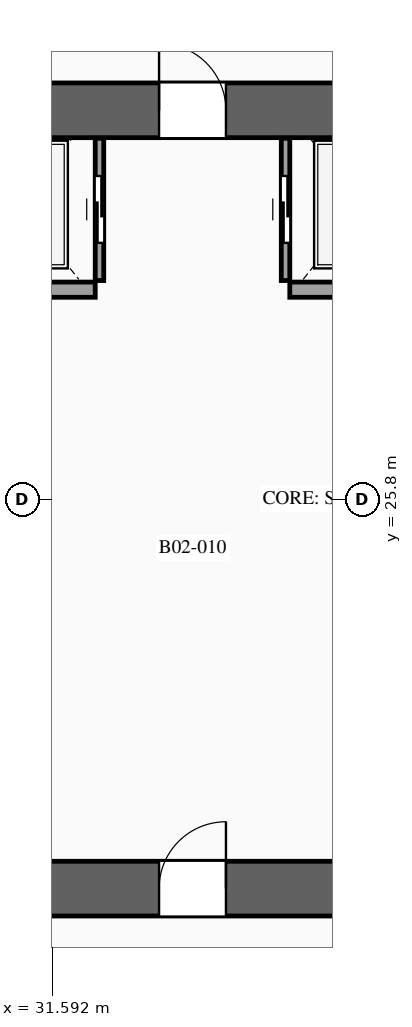
"""IFC4 building model, lengths in metres.
Left out: names, types, materials, properties, quantities, classifications, styles, units other than length and angle.
Written with IfcOpenShell. Run it as: python <this file> out.ifc"""

import sys

from ifc_helpers import new_model, si_unit, direction, frame, frame_2d, origin, place, context, subcontext, project, spatial, rectangle, extrude, source, transform, mapped, element, fill, save


model = new_model("IFC4")
c1 = context("Model", 3, precision=1e-05, world=origin(), true_north=direction((0.0, 1.0)))
c2 = subcontext(c1, "Body", "Model", "MODEL_VIEW")
j1 = project(units=[si_unit("LENGTHUNIT", "METRE"), si_unit("PLANEANGLEUNIT", "RADIAN")], contexts=[c1])
p1 = place(None, origin())
s1 = spatial("IfcSite", under=j1, at=p1, CompositionType="ELEMENT")
p2 = place(p1, origin())
s2 = spatial("IfcBuilding", under=s1, at=p2, CompositionType="ELEMENT")
p3 = place(p2, frame((0.0, 0.0, -9.0)))
s3 = spatial("IfcBuildingStorey", under=s2, at=p3, CompositionType="ELEMENT", Elevation=-9.0)
p4 = place(p3, frame((23.35, 19.4, 0.0), z_axis=(0.0, 0.0, 1.0), x_axis=(1.0, 0.0, 0.0)))
e1 = element("IfcWall", 1, at=p4, inside=s3, PredefinedType="SHEAR", context=c2, shape_type="SweptSolid", body=[
    extrude(rectangle(XDim=27.3, YDim=0.9, at=frame_2d((13.65, 0.0))), origin(), (0.0, 0.0, 1.0), 4.5),
])
p5 = place(p4, frame((2.1, 0.0, 0.0)))
e2 = element("IfcOpeningElement", 2, at=p5, cuts=e1, PredefinedType="OPENING", context=c2, shape_type="SweptSolid", body=[
    extrude(rectangle(XDim=1.1, YDim=2.2, at=frame_2d((0.55, 1.1))), frame((0.0, 0.465, 0.0), z_axis=(0.0, -1.0, 0.0), x_axis=(1.0, 0.0, 0.0)), (0.0, 0.0, 1.0), 0.93),
])
p6 = place(p4, frame((10.0, 0.0, 0.0)))
e3 = element("IfcOpeningElement", 3, at=p6, cuts=e1, PredefinedType="OPENING", context=c2, shape_type="SweptSolid", body=[
    extrude(rectangle(XDim=1.1, YDim=2.2, at=frame_2d((0.55, 1.1))), frame((0.0, 0.465, 0.0), z_axis=(0.0, -1.0, 0.0), x_axis=(1.0, 0.0, 0.0)), (0.0, 0.0, 1.0), 0.93),
])
p7 = place(p4, frame((23.2, 0.0, 0.0)))
e4 = element("IfcOpeningElement", 4, at=p7, cuts=e1, PredefinedType="OPENING", context=c2, shape_type="SweptSolid", body=[
    extrude(rectangle(XDim=1.1, YDim=2.2, at=frame_2d((0.55, 1.1))), frame((0.0, 0.465, 0.0), z_axis=(0.0, -1.0, 0.0), x_axis=(1.0, 0.0, 0.0)), (0.0, 0.0, 1.0), 0.93),
])
p8 = place(p4, frame((19.82, 0.0, 0.0)))
e5 = element("IfcOpeningElement", 5, at=p8, cuts=e1, PredefinedType="OPENING", context=c2, shape_type="SweptSolid", body=[
    extrude(rectangle(XDim=0.9, YDim=2.15, at=frame_2d((0.45, 1.075))), frame((0.0, 0.465, 0.0), z_axis=(0.0, -1.0, 0.0), x_axis=(1.0, 0.0, 0.0)), (0.0, 0.0, 1.0), 0.93),
])
p9 = place(p4, frame((18.38, 0.0, 0.0)))
e6 = element("IfcOpeningElement", 6, at=p9, cuts=e1, PredefinedType="OPENING", context=c2, shape_type="SweptSolid", body=[
    extrude(rectangle(XDim=0.9, YDim=2.15, at=frame_2d((0.45, 1.075))), frame((0.0, 0.465, 0.0), z_axis=(0.0, -1.0, 0.0), x_axis=(1.0, 0.0, 0.0)), (0.0, 0.0, 1.0), 0.93),
])
p10 = place(p3, frame((23.35, 32.2, 0.0), z_axis=(0.0, 0.0, 1.0), x_axis=(1.0, 0.0, 0.0)))
e7 = element("IfcWall", 7, at=p10, inside=s3, PredefinedType="SHEAR", context=c2, shape_type="SweptSolid", body=[
    extrude(rectangle(XDim=27.3, YDim=0.9, at=frame_2d((13.65, 0.0))), origin(), (0.0, 0.0, 1.0), 4.5),
])
p11 = place(p10, frame((4.72, 0.0, 0.0)))
e8 = element("IfcOpeningElement", 8, at=p11, cuts=e7, PredefinedType="OPENING", context=c2, shape_type="SweptSolid", body=[
    extrude(rectangle(XDim=0.9, YDim=2.15, at=frame_2d((0.45, 1.075))), frame((0.0, 0.465, 0.0), z_axis=(0.0, -1.0, 0.0), x_axis=(1.0, 0.0, 0.0)), (0.0, 0.0, 1.0), 0.93),
])
p12 = place(p10, frame((10.0, 0.0, 0.0)))
e9 = element("IfcOpeningElement", 9, at=p12, cuts=e7, PredefinedType="OPENING", context=c2, shape_type="SweptSolid", body=[
    extrude(rectangle(XDim=1.1, YDim=2.2, at=frame_2d((0.55, 1.1))), frame((0.0, 0.465, 0.0), z_axis=(0.0, -1.0, 0.0), x_axis=(1.0, 0.0, 0.0)), (0.0, 0.0, 1.0), 0.93),
])
p13 = place(p10, frame((15.85, 0.0, 0.0)))
e10 = element("IfcOpeningElement", 10, at=p13, cuts=e7, PredefinedType="OPENING", context=c2, shape_type="SweptSolid", body=[
    extrude(rectangle(XDim=1.1, YDim=2.2, at=frame_2d((0.55, 1.1))), frame((0.0, 0.465, 0.0), z_axis=(0.0, -1.0, 0.0), x_axis=(1.0, 0.0, 0.0)), (0.0, 0.0, 1.0), 0.93),
])
p14 = place(p3, frame((32.37, 29.4, 0.0), z_axis=(0.0, 0.0, 1.0), x_axis=(0.0, 1.0, 0.0)))
e11 = element("IfcWall", 11, at=p14, inside=s3, PredefinedType="SOLIDWALL", context=c2, shape_type="SweptSolid", body=[
    extrude(rectangle(XDim=2.34, YDim=0.14, at=frame_2d((1.17, 0.0))), origin(), (0.0, 0.0, 1.0), 4.2),
])
p15 = place(p14, frame((0.62, 0.0, 0.0)))
e12 = element("IfcOpeningElement", 12, at=p15, cuts=e11, PredefinedType="OPENING", context=c2, shape_type="SweptSolid", body=[
    extrude(rectangle(XDim=1.1, YDim=2.2, at=frame_2d((0.55, 1.1))), frame((0.0, 0.085, 0.0), z_axis=(0.0, -1.0, 0.0), x_axis=(1.0, 0.0, 0.0)), (0.0, 0.0, 1.0), 0.17),
])
m1 = source(origin(), c2, "Body", "SweptSolid", [
    extrude(rectangle(XDim=2.5, YDim=0.25, at=frame_2d((1.25, 0.0))), origin(), (0.0, 0.0, 1.0), 4.2),
])
p16 = place(p3, frame((29.8, 29.25, 0.0), z_axis=(0.0, 0.0, 1.0), x_axis=(1.0, 0.0, 0.0)))
e13 = element("IfcWall", 13, at=p16, inside=s3, PredefinedType="SOLIDWALL", context=c2, shape_type="MappedRepresentation", body=[
    mapped(m1, transform((0.0, 0.0, 0.0), scale=1.0)),
])
p17 = place(p3, frame((35.43, 29.4, 0.0), z_axis=(0.0, 0.0, 1.0), x_axis=(0.0, 1.0, 0.0)))
e14 = element("IfcWall", 14, at=p17, inside=s3, PredefinedType="SOLIDWALL", context=c2, shape_type="SweptSolid", body=[
    extrude(rectangle(XDim=2.34, YDim=0.14, at=frame_2d((1.17, 0.0))), origin(), (0.0, 0.0, 1.0), 4.2),
])
p18 = place(p17, frame((0.62, 0.0, 0.0)))
e15 = element("IfcOpeningElement", 15, at=p18, cuts=e14, PredefinedType="OPENING", context=c2, shape_type="SweptSolid", body=[
    extrude(rectangle(XDim=1.1, YDim=2.2, at=frame_2d((0.55, 1.1))), frame((0.0, 0.085, 0.0), z_axis=(0.0, -1.0, 0.0), x_axis=(1.0, 0.0, 0.0)), (0.0, 0.0, 1.0), 0.17),
])
m2 = source(origin(), c2, "Body", "SweptSolid", [
    extrude(rectangle(XDim=2.4, YDim=0.25, at=frame_2d((1.2, 0.0))), origin(), (0.0, 0.0, 1.0), 4.2),
])
p19 = place(p3, frame((35.5, 29.25, 0.0), z_axis=(0.0, 0.0, 1.0), x_axis=(1.0, 0.0, 0.0)))
e16 = element("IfcWall", 16, at=p19, inside=s3, PredefinedType="SOLIDWALL", context=c2, shape_type="MappedRepresentation", body=[
    mapped(m2, transform((0.0, 0.0, 0.0), scale=1.0)),
])
m3 = source(origin(), c2, "Body", "SweptSolid", [
    extrude(rectangle(XDim=1.1, YDim=2.2, at=frame_2d((0.55, 1.1))), frame((0.0, 0.025, 0.0), z_axis=(0.0, -1.0, 0.0), x_axis=(1.0, 0.0, 0.0)), (0.0, 0.0, 1.0), 0.05),
])
p20 = place(p15, origin())
e17 = element("IfcDoor", 17, at=p20, inside=s3, OperationType="SLIDING_TO_LEFT", PredefinedType="DOOR", context=c2, shape_type="MappedRepresentation", body=[
    mapped(m3, transform((0.0, 0.0, 0.0), scale=1.0)),
])
fill(e12, e17)
p21 = place(p18, origin())
e18 = element("IfcDoor", 18, at=p21, inside=s3, OperationType="SLIDING_TO_RIGHT", PredefinedType="DOOR", context=c2, shape_type="MappedRepresentation", body=[
    mapped(m3, transform((0.0, 0.0, 0.0), scale=1.0)),
])
fill(e15, e18)
m4 = source(origin(), c2, "Body", "SweptSolid", [
    extrude(rectangle(XDim=1.1, YDim=2.2, at=frame_2d((0.55, 1.1))), frame((0.0, 0.025, 0.0), z_axis=(0.0, -1.0, 0.0), x_axis=(1.0, 0.0, 0.0)), (0.0, 0.0, 1.0), 0.05),
])
p22 = place(p6, origin())
e19 = element("IfcDoor", 19, at=p22, inside=s3, OperationType="SINGLE_SWING_RIGHT", PredefinedType="DOOR", context=c2, shape_type="MappedRepresentation", body=[
    mapped(m4, transform((0.0, 0.0, 0.0), scale=1.0)),
])
fill(e3, e19)
p23 = place(p12, origin())
e20 = element("IfcDoor", 20, at=p23, inside=s3, OperationType="SINGLE_SWING_LEFT", PredefinedType="DOOR", context=c2, shape_type="MappedRepresentation", body=[
    mapped(m4, transform((0.0, 0.0, 0.0), scale=1.0)),
])
fill(e9, e20)
save(model, sys.argv[1])
